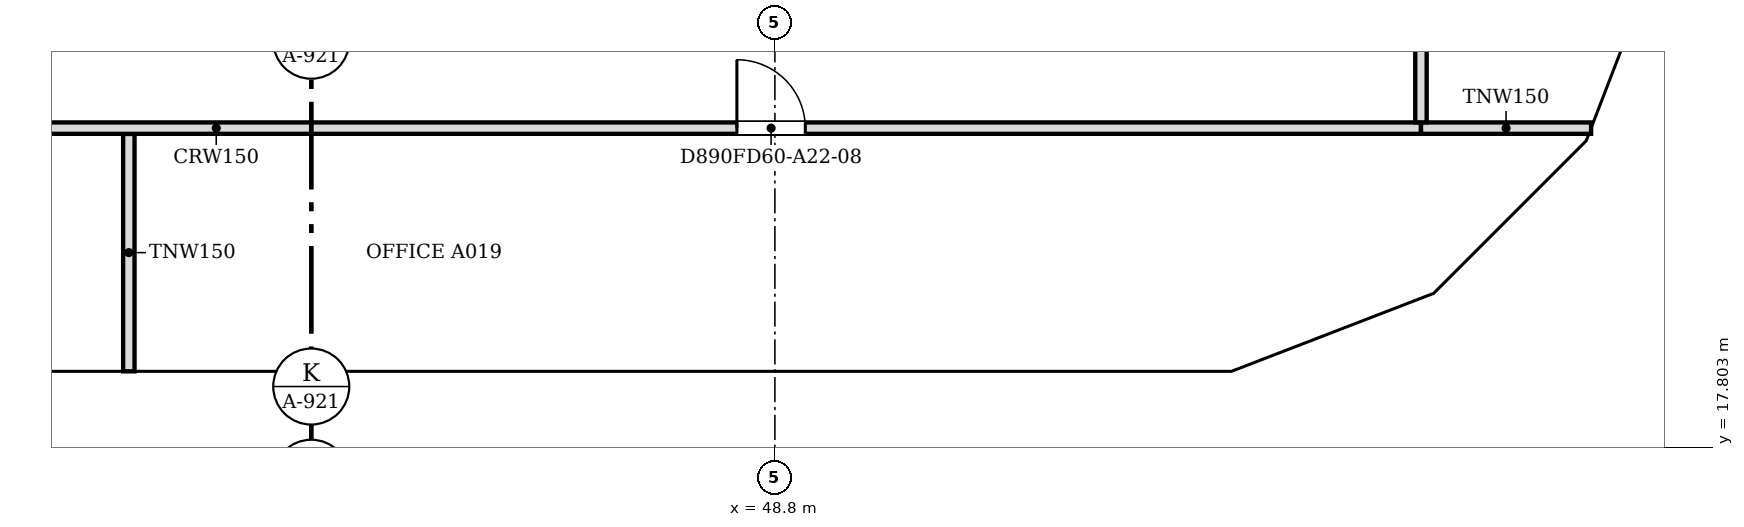
"""IFC4 building model, lengths in metres.
Left out: names, types, materials, properties, quantities, classifications, styles, units other than length and angle.
Written with IfcOpenShell. Run it as: python <this file> out.ifc"""

import sys

from ifc_helpers import new_model, si_unit, direction, frame, frame_2d, origin, place, context, subcontext, project, spatial, polyline, rectangle, outline, extrude, faceted_brep, source, transform, mapped, element, fill, save


model = new_model("IFC4")
c1 = context("Model", 3, precision=1e-05, world=origin(), true_north=direction((0.0, 1.0)))
c2 = subcontext(c1, "Body", "Model", "MODEL_VIEW")
j1 = project(units=[si_unit("LENGTHUNIT", "METRE"), si_unit("PLANEANGLEUNIT", "RADIAN")], contexts=[c1])
p1 = place(None, origin())
s1 = spatial("IfcSite", under=j1, at=p1, CompositionType="ELEMENT")
p2 = place(p1, origin())
s2 = spatial("IfcBuilding", under=s1, at=p2, CompositionType="ELEMENT")
p3 = place(p2, frame((0.0, 0.0, 252.1)))
s3 = spatial("IfcBuildingStorey", under=s2, at=p3, CompositionType="ELEMENT", Elevation=252.1)
m1 = source(origin(), c2, "Body", "Brep", [
    faceted_brep([(3.05, -0.25, 0.0), (6.1, -0.25, 3.8), (6.1, -0.25, 3.8), (3.05, -0.25, 7.6), (0.0, -0.25, 3.8), (0.0, 0.25, 3.8), (3.05, 0.25, 7.6), (6.1, 0.25, 3.8), (6.1, 0.25, 3.8), (3.05, 0.25, 0.0)], [[[0, 1, 2, 3, 4]], [[5, 6, 7, 8, 9]], [[9, 8, 1, 0]], [[7, 6, 3, 2]], [[6, 5, 4, 3]], [[5, 9, 0, 4]], [[1, 8, 7, 2]]]),
])
p4 = place(p3, frame((33.55, 18.55, -3.8), z_axis=(0.0, 0.0, 1.0), x_axis=(1.0, 0.0, 0.0)))
e1 = element("IfcWall", 1, at=p4, inside=s3, PredefinedType="SOLIDWALL", context=c2, shape_type="MappedRepresentation", body=[
    mapped(m1, transform((0.0, 0.0, 0.0), scale=1.0)),
])
m2 = source(origin(), c2, "Body", "SweptSolid", [
    extrude(outline(polyline([(3.05, 0.399), (5.78, 3.8), (3.05, 7.2), (0.321, 3.8), (3.05, 0.399)])), frame((0.0, 0.26, 0.0), z_axis=(0.0, -1.0, 0.0), x_axis=(1.0, 0.0, 0.0)), (0.0, 0.0, 1.0), 0.52),
])
p5 = place(p4, origin())
e2 = element("IfcOpeningElement", 2, at=p5, cuts=e1, PredefinedType="OPENING", context=c2, shape_type="MappedRepresentation", body=[
    mapped(m2, transform((0.0, 0.0, 0.0), scale=1.0)),
])
m3 = source(origin(), c2, "Body", "SweptSolid", [
    extrude(outline(polyline([(3.05, 0.0), (6.1, 3.8), (3.05, 7.6), (0.0, 3.8), (3.05, 0.0)])), frame((0.0, 0.25, 0.0), z_axis=(0.0, -1.0, 0.0), x_axis=(1.0, 0.0, 0.0)), (0.0, 0.0, 1.0), 0.5),
])
p6 = place(p3, frame((39.65, 18.55, -3.8), z_axis=(0.0, 0.0, 1.0), x_axis=(1.0, 0.0, 0.0)))
e3 = element("IfcWall", 3, at=p6, inside=s3, PredefinedType="SOLIDWALL", context=c2, shape_type="MappedRepresentation", body=[
    mapped(m3, transform((0.0, 0.0, 0.0), scale=1.0)),
])
p7 = place(p6, origin())
e4 = element("IfcOpeningElement", 4, at=p7, cuts=e3, PredefinedType="OPENING", context=c2, shape_type="MappedRepresentation", body=[
    mapped(m2, transform((0.0, 0.0, 0.0), scale=1.0)),
])
p8 = place(p3, frame((45.75, 18.55, -3.8), z_axis=(0.0, 0.0, 1.0), x_axis=(1.0, 0.0, 0.0)))
e5 = element("IfcWall", 5, at=p8, inside=s3, PredefinedType="SOLIDWALL", context=c2, shape_type="MappedRepresentation", body=[
    mapped(m3, transform((0.0, 0.0, 0.0), scale=1.0)),
])
p9 = place(p8, origin())
e6 = element("IfcOpeningElement", 6, at=p9, cuts=e5, PredefinedType="OPENING", context=c2, shape_type="MappedRepresentation", body=[
    mapped(m2, transform((0.0, 0.0, 0.0), scale=1.0)),
])
m4 = source(origin(), c2, "Body", "Brep", [
    faceted_brep([(3.003, -0.25, 0.0), (3.05, -0.25, 0.06), (3.05, -0.25, 7.54), (3.003, -0.25, 7.6), (0.0, -0.25, 3.8), (0.0, 0.25, 3.8), (2.957, 0.25, 7.541), (2.957, 0.25, 0.059), (3.003, 0.0, 0.0), (3.003, 0.0, 7.6)], [[[0, 1, 2, 3, 4]], [[5, 6, 7]], [[1, 0, 8]], [[9, 3, 2]], [[6, 5, 4, 3, 9]], [[5, 7, 8, 0, 4]], [[1, 8, 7, 6, 9, 2]]]),
])
p10 = place(p3, frame((51.85, 18.55, -3.8), z_axis=(0.0, 0.0, 1.0), x_axis=(1.0, 0.0, 0.0)))
e7 = element("IfcWall", 7, at=p10, inside=s3, PredefinedType="SOLIDWALL", context=c2, shape_type="MappedRepresentation", body=[
    mapped(m4, transform((0.0, 0.0, 0.0), scale=1.0)),
])
m5 = source(origin(), c2, "Body", "SweptSolid", [
    extrude(outline(polyline([(2.803, 6.944), (0.319, 3.8), (2.803, 0.656), (2.803, 6.944)])), frame((0.0, 0.26, 0.0), z_axis=(0.0, -1.0, 0.0), x_axis=(1.0, 0.0, 0.0)), (0.0, 0.0, 1.0), 0.52),
])
p11 = place(p10, origin())
e8 = element("IfcOpeningElement", 8, at=p11, cuts=e7, PredefinedType="OPENING", context=c2, shape_type="MappedRepresentation", body=[
    mapped(m5, transform((0.0, 0.0, 0.0), scale=1.0)),
])
m6 = source(origin(), c2, "Body", "Brep", [
    faceted_brep([(0.047, -0.25, 0.0), (2.997, -0.25, 3.8), (0.047, -0.25, 7.6), (0.0, -0.25, 7.541), (0.0, -0.25, 0.059), (0.093, 0.25, 7.54), (2.944, 0.25, 3.868), (2.944, 0.25, 3.732), (0.093, 0.25, 0.06), (2.997, 0.0, 3.8), (0.047, 0.0, 0.0), (0.047, 0.0, 7.6)], [[[0, 1, 2, 3, 4]], [[5, 6, 7, 8]], [[8, 7, 9, 1, 0, 10]], [[6, 5, 11, 2, 1, 9]], [[3, 2, 11]], [[10, 0, 4]], [[8, 10, 4, 3, 11, 5]], [[7, 6, 9]]]),
])
p12 = place(p3, frame((54.81, 18.533, -3.8), z_axis=(0.0, 0.0, 1.0), x_axis=(0.932990326376, 0.359901446078, 0.0)))
e9 = element("IfcWall", 9, at=p12, inside=s3, PredefinedType="SOLIDWALL", context=c2, shape_type="MappedRepresentation", body=[
    mapped(m6, transform((0.0, 0.0, 0.0), scale=1.0)),
])
m7 = source(origin(), c2, "Body", "SweptSolid", [
    extrude(outline(polyline([(0.247, 0.665), (2.681, 3.8), (0.247, 6.935), (0.247, 0.665)])), frame((0.0, 0.26, 0.0), z_axis=(0.0, -1.0, 0.0), x_axis=(1.0, 0.0, 0.0)), (0.0, 0.0, 1.0), 0.52),
])
p13 = place(p12, origin())
e10 = element("IfcOpeningElement", 10, at=p13, cuts=e9, PredefinedType="OPENING", context=c2, shape_type="MappedRepresentation", body=[
    mapped(m7, transform((0.0, 0.0, 0.0), scale=1.0)),
])
m8 = source(origin(), c2, "Body", "Brep", [
    faceted_brep([(2.944, -0.25, 0.0), (2.997, -0.25, 0.068), (2.997, -0.25, 7.532), (2.944, -0.25, 7.6), (0.0, -0.25, 3.8), (0.053, 0.25, 3.868), (2.891, 0.25, 7.532), (2.891, 0.25, 0.068), (0.053, 0.25, 3.732), (2.944, 0.0, 0.0), (2.944, 0.0, 7.6), (0.0, 0.0, 3.8)], [[[0, 1, 2, 3, 4]], [[5, 6, 7, 8]], [[1, 0, 9]], [[10, 3, 2]], [[6, 5, 11, 4, 3, 10]], [[8, 7, 9, 0, 4, 11]], [[8, 11, 5]], [[1, 9, 7, 6, 10, 2]]]),
])
p14 = place(p3, frame((57.606, 19.612, -3.8), z_axis=(0.0, 0.0, 1.0), x_axis=(0.707106781187, 0.707106781187, 0.0)))
e11 = element("IfcWall", 11, at=p14, inside=s3, PredefinedType="SOLIDWALL", context=c2, shape_type="MappedRepresentation", body=[
    mapped(m8, transform((0.0, 0.0, 0.0), scale=1.0)),
])
m9 = source(origin(), c2, "Body", "SweptSolid", [
    extrude(outline(polyline([(2.744, 6.934), (0.316, 3.8), (2.744, 0.666), (2.744, 6.934)])), frame((0.0, 0.26, 0.0), z_axis=(0.0, -1.0, 0.0), x_axis=(1.0, 0.0, 0.0)), (0.0, 0.0, 1.0), 0.52),
])
p15 = place(p14, origin())
e12 = element("IfcOpeningElement", 12, at=p15, cuts=e11, PredefinedType="OPENING", context=c2, shape_type="MappedRepresentation", body=[
    mapped(m9, transform((0.0, 0.0, 0.0), scale=1.0)),
])
m10 = source(origin(), c2, "Body", "Brep", [
    faceted_brep([(0.053, -0.25, 0.0), (3.003, -0.25, 3.8), (0.053, -0.25, 7.6), (0.0, -0.25, 7.531), (0.0, -0.25, 0.068), (0.106, 0.25, 7.532), (2.957, 0.25, 3.86), (2.957, 0.25, 3.74), (0.106, 0.25, 0.068), (3.003, 0.0, 3.8), (0.053, 0.0, 0.0), (0.053, 0.0, 7.6)], [[[0, 1, 2, 3, 4]], [[5, 6, 7, 8]], [[8, 7, 9, 1, 0, 10]], [[6, 5, 11, 2, 1, 9]], [[3, 2, 11]], [[10, 0, 4]], [[8, 10, 4, 3, 11, 5]], [[7, 6, 9]]]),
])
p16 = place(p3, frame((59.669, 21.644, -3.8), z_axis=(0.0, 0.0, 1.0), x_axis=(0.35992665181, 0.932980602862, 0.0)))
e13 = element("IfcWall", 13, at=p16, inside=s3, PredefinedType="SOLIDWALL", context=c2, shape_type="MappedRepresentation", body=[
    mapped(m10, transform((0.0, 0.0, 0.0), scale=1.0)),
])
m11 = source(origin(), c2, "Body", "SweptSolid", [
    extrude(outline(polyline([(0.253, 0.665), (2.687, 3.8), (0.253, 6.935), (0.253, 0.665)])), frame((0.0, 0.26, 0.0), z_axis=(0.0, -1.0, 0.0), x_axis=(1.0, 0.0, 0.0)), (0.0, 0.0, 1.0), 0.52),
])
p17 = place(p16, origin())
e14 = element("IfcOpeningElement", 14, at=p17, cuts=e13, PredefinedType="OPENING", context=c2, shape_type="MappedRepresentation", body=[
    mapped(m11, transform((0.0, 0.0, 0.0), scale=1.0)),
])
p18 = place(p2, frame((0.0, 0.0, 255.9)))
s4 = spatial("IfcBuildingStorey", under=s2, at=p18, CompositionType="ELEMENT", Elevation=255.9)
m12 = source(origin(), c2, "Body", "Brep", [
    faceted_brep([(3.05, -0.25, 0.0), (6.1, -0.25, 3.8), (6.1, -0.25, 3.8), (3.05, -0.25, 7.6), (0.0, -0.25, 3.8), (0.0, 0.25, 3.8), (3.05, 0.25, 7.6), (6.1, 0.25, 3.8), (6.1, 0.25, 3.8), (3.05, 0.25, 0.0)], [[[0, 1, 2, 3, 4]], [[5, 6, 7, 8, 9]], [[9, 8, 1, 0]], [[7, 6, 3, 2]], [[6, 5, 4, 3]], [[5, 9, 0, 4]], [[1, 8, 7, 2]]]),
])
p19 = place(p18, frame((36.6, 18.55, -3.8), z_axis=(0.0, 0.0, 1.0), x_axis=(1.0, 0.0, 0.0)))
e15 = element("IfcWall", 15, at=p19, inside=s4, PredefinedType="SOLIDWALL", context=c2, shape_type="MappedRepresentation", body=[
    mapped(m12, transform((0.0, 0.0, 0.0), scale=1.0)),
])
m13 = source(origin(), c2, "Body", "SweptSolid", [
    extrude(outline(polyline([(3.05, 0.399), (5.78, 3.8), (3.05, 7.2), (0.321, 3.8), (3.05, 0.399)])), frame((0.0, 0.26, 0.0), z_axis=(0.0, -1.0, 0.0), x_axis=(1.0, 0.0, 0.0)), (0.0, 0.0, 1.0), 0.52),
])
p20 = place(p19, origin())
e16 = element("IfcOpeningElement", 16, at=p20, cuts=e15, PredefinedType="OPENING", context=c2, shape_type="MappedRepresentation", body=[
    mapped(m13, transform((0.0, 0.0, 0.0), scale=1.0)),
])
m14 = source(origin(), c2, "Body", "SweptSolid", [
    extrude(outline(polyline([(3.05, 0.0), (6.1, 3.8), (3.05, 7.6), (0.0, 3.8), (3.05, 0.0)])), frame((0.0, 0.25, 0.0), z_axis=(0.0, -1.0, 0.0), x_axis=(1.0, 0.0, 0.0)), (0.0, 0.0, 1.0), 0.5),
])
p21 = place(p18, frame((42.7, 18.55, -3.8), z_axis=(0.0, 0.0, 1.0), x_axis=(1.0, 0.0, 0.0)))
e17 = element("IfcWall", 17, at=p21, inside=s4, PredefinedType="SOLIDWALL", context=c2, shape_type="MappedRepresentation", body=[
    mapped(m14, transform((0.0, 0.0, 0.0), scale=1.0)),
])
p22 = place(p21, origin())
e18 = element("IfcOpeningElement", 18, at=p22, cuts=e17, PredefinedType="OPENING", context=c2, shape_type="MappedRepresentation", body=[
    mapped(m13, transform((0.0, 0.0, 0.0), scale=1.0)),
])
m15 = source(origin(), c2, "Body", "Brep", [
    faceted_brep([(3.05, -0.25, 0.0), (6.053, -0.25, 3.8), (3.05, -0.25, 7.6), (0.0, -0.25, 3.8), (0.0, 0.25, 3.8), (3.05, 0.25, 7.6), (6.007, 0.25, 3.859), (6.007, 0.25, 3.741), (3.05, 0.25, 0.0), (6.053, 0.0, 3.8)], [[[0, 1, 2, 3]], [[4, 5, 6, 7, 8]], [[8, 7, 9, 1, 0]], [[6, 5, 2, 1, 9]], [[5, 4, 3, 2]], [[4, 8, 0, 3]], [[9, 7, 6]]]),
])
p23 = place(p18, frame((48.8, 18.55, -3.8), z_axis=(0.0, 0.0, 1.0), x_axis=(1.0, 0.0, 0.0)))
e19 = element("IfcWall", 19, at=p23, inside=s4, PredefinedType="SOLIDWALL", context=c2, shape_type="MappedRepresentation", body=[
    mapped(m15, transform((0.0, 0.0, 0.0), scale=1.0)),
])
m16 = source(origin(), c2, "Body", "SweptSolid", [
    extrude(outline(polyline([(3.049, 0.401), (5.735, 3.8), (3.049, 7.199), (0.321, 3.8), (3.049, 0.401)])), frame((0.0, 0.26, 0.0), z_axis=(0.0, -1.0, 0.0), x_axis=(1.0, 0.0, 0.0)), (0.0, 0.0, 1.0), 0.52),
])
p24 = place(p23, origin())
e20 = element("IfcOpeningElement", 20, at=p24, cuts=e19, PredefinedType="OPENING", context=c2, shape_type="MappedRepresentation", body=[
    mapped(m16, transform((0.0, 0.0, 0.0), scale=1.0)),
])
m17 = source(origin(), c2, "Body", "Brep", [
    faceted_brep([(2.95, -0.25, 0.0), (3.003, -0.25, 0.068), (3.003, -0.25, 7.531), (2.95, -0.25, 7.6), (0.0, -0.25, 3.8), (0.047, 0.25, 3.86), (2.898, 0.25, 7.532), (2.898, 0.25, 0.068), (0.047, 0.25, 3.74), (2.95, 0.0, 0.0), (2.95, 0.0, 7.6), (0.0, 0.0, 3.8)], [[[0, 1, 2, 3, 4]], [[5, 6, 7, 8]], [[1, 0, 9]], [[10, 3, 2]], [[6, 5, 11, 4, 3, 10]], [[8, 7, 9, 0, 4, 11]], [[8, 11, 5]], [[1, 9, 7, 6, 10, 2]]]),
])
p25 = place(p18, frame((54.854, 18.55, -3.8), z_axis=(0.0, 0.0, 1.0), x_axis=(0.932997369089, 0.359883188373, 0.0)))
e21 = element("IfcWall", 21, at=p25, inside=s4, PredefinedType="SOLIDWALL", context=c2, shape_type="MappedRepresentation", body=[
    mapped(m17, transform((0.0, 0.0, 0.0), scale=1.0)),
])
m18 = source(origin(), c2, "Body", "SweptSolid", [
    extrude(outline(polyline([(2.75, 6.935), (0.316, 3.8), (2.75, 0.665), (2.75, 6.935)])), frame((0.0, 0.26, 0.0), z_axis=(0.0, -1.0, 0.0), x_axis=(1.0, 0.0, 0.0)), (0.0, 0.0, 1.0), 0.52),
])
p26 = place(p25, origin())
e22 = element("IfcOpeningElement", 22, at=p26, cuts=e21, PredefinedType="OPENING", context=c2, shape_type="MappedRepresentation", body=[
    mapped(m18, transform((0.0, 0.0, 0.0), scale=1.0)),
])
m19 = source(origin(), c2, "Body", "Brep", [
    faceted_brep([(0.053, -0.25, 0.0), (2.997, -0.25, 3.8), (0.053, -0.25, 7.6), (0.0, -0.25, 7.532), (0.0, -0.25, 0.068), (0.106, 0.25, 7.531), (2.944, 0.25, 3.868), (2.944, 0.25, 3.732), (0.106, 0.25, 0.068), (2.997, 0.0, 3.8), (0.053, 0.0, 0.0), (0.053, 0.0, 7.6)], [[[0, 1, 2, 3, 4]], [[5, 6, 7, 8]], [[8, 7, 9, 1, 0, 10]], [[6, 5, 11, 2, 1, 9]], [[3, 2, 11]], [[10, 0, 4]], [[8, 10, 4, 3, 11, 5]], [[9, 7, 6]]]),
])
p27 = place(p18, frame((57.569, 19.574, -3.8), z_axis=(0.0, 0.0, 1.0), x_axis=(0.707106781187, 0.707106781187, 0.0)))
e23 = element("IfcWall", 23, at=p27, inside=s4, PredefinedType="SOLIDWALL", context=c2, shape_type="MappedRepresentation", body=[
    mapped(m19, transform((0.0, 0.0, 0.0), scale=1.0)),
])
m20 = source(origin(), c2, "Body", "SweptSolid", [
    extrude(outline(polyline([(0.253, 0.666), (2.681, 3.8), (0.253, 6.934), (0.253, 0.666)])), frame((0.0, 0.26, 0.0), z_axis=(0.0, -1.0, 0.0), x_axis=(1.0, 0.0, 0.0)), (0.0, 0.0, 1.0), 0.52),
])
p28 = place(p27, origin())
e24 = element("IfcOpeningElement", 24, at=p28, cuts=e23, PredefinedType="OPENING", context=c2, shape_type="MappedRepresentation", body=[
    mapped(m20, transform((0.0, 0.0, 0.0), scale=1.0)),
])
m21 = source(origin(), c2, "Body", "Brep", [
    faceted_brep([(2.95, -0.25, 0.0), (2.997, -0.25, 0.059), (2.997, -0.25, 7.541), (2.95, -0.25, 7.6), (0.0, -0.25, 3.8), (0.053, 0.25, 3.868), (2.904, 0.25, 7.54), (2.904, 0.25, 0.06), (0.053, 0.25, 3.732), (2.95, 0.0, 0.0), (2.95, 0.0, 7.6), (0.0, 0.0, 3.8)], [[[0, 1, 2, 3, 4]], [[5, 6, 7, 8]], [[1, 0, 9]], [[10, 3, 2]], [[6, 5, 11, 4, 3, 10]], [[8, 7, 9, 0, 4, 11]], [[8, 11, 5]], [[1, 9, 7, 6, 10, 2]]]),
])
p29 = place(p18, frame((59.688, 21.694, -3.8), z_axis=(0.0, 0.0, 1.0), x_axis=(0.359972353723, 0.932962970624, 0.0)))
e25 = element("IfcWall", 25, at=p29, inside=s4, PredefinedType="SOLIDWALL", context=c2, shape_type="MappedRepresentation", body=[
    mapped(m21, transform((0.0, 0.0, 0.0), scale=1.0)),
])
p30 = place(p29, origin())
e26 = element("IfcOpeningElement", 26, at=p30, cuts=e25, PredefinedType="OPENING", context=c2, shape_type="MappedRepresentation", body=[
    mapped(m18, transform((0.0, 0.0, 0.0), scale=1.0)),
])
p31 = place(p3, frame((40.3, 18.8, 0.0), z_axis=(0.0, 0.0, 1.0), x_axis=(0.0, 1.0, 0.0)))
e27 = element("IfcWall", 27, at=p31, inside=s3, PredefinedType="PARTITIONING", context=c2, shape_type="SweptSolid", body=[
    extrude(rectangle(XDim=3.124, YDim=0.15, at=frame_2d((1.562, 0.0))), origin(), (0.0, 0.0, 1.0), 3.067),
])
p32 = place(p3, frame((57.3, 22.0, 0.0), z_axis=(0.0, 0.0, 1.0), x_axis=(-1.0, 0.0, 0.0)))
e28 = element("IfcWall", 28, at=p32, inside=s3, PredefinedType="PARTITIONING", context=c2, shape_type="SweptSolid", body=[
    extrude(rectangle(XDim=29.2, YDim=0.15, at=frame_2d((14.6, 0.0))), origin(), (0.0, 0.0, 1.0), 3.067),
])
m22 = source(origin(), c2, "Body", "SweptSolid", [
    extrude(rectangle(XDim=0.9, YDim=2.1, at=frame_2d((0.45, 1.05))), frame((0.0, 0.085, 0.0), z_axis=(0.0, -1.0, 0.0), x_axis=(1.0, 0.0, 0.0)), (0.0, 0.0, 1.0), 0.17),
])
p33 = place(p32, frame((22.7, 0.0, 0.0)))
e29 = element("IfcOpeningElement", 29, at=p33, cuts=e28, PredefinedType="OPENING", context=c2, shape_type="MappedRepresentation", body=[
    mapped(m22, transform((0.0, 0.0, 0.0), scale=1.0)),
])
p34 = place(p32, frame((8.1, 0.0, 0.0)))
e30 = element("IfcOpeningElement", 30, at=p34, cuts=e28, PredefinedType="OPENING", context=c2, shape_type="MappedRepresentation", body=[
    mapped(m22, transform((0.0, 0.0, 0.0), scale=1.0)),
])
p35 = place(p3, frame((57.301, 22.0, 0.0), z_axis=(0.0, 0.0, 1.0), x_axis=(1.0, 0.0, 0.0)))
e31 = element("IfcWall", 31, at=p35, inside=s3, PredefinedType="PARTITIONING", context=c2, shape_type="SweptSolid", body=[
    extrude(rectangle(XDim=2.237, YDim=0.15, at=frame_2d((1.119, 0.0))), origin(), (0.0, 0.0, 1.0), 3.067),
])
p36 = place(p3, frame((57.3, 30.6, 0.0), z_axis=(0.0, 0.0, 1.0), x_axis=(0.0, -1.0, 0.0)))
e32 = element("IfcWall", 32, at=p36, inside=s3, PredefinedType="PARTITIONING", context=c2, shape_type="SweptSolid", body=[
    extrude(rectangle(XDim=8.524, YDim=0.15, at=frame_2d((4.262, 0.0))), origin(), (0.0, 0.0, 1.0), 3.067),
])
p37 = place(p36, frame((3.824, 0.0, 0.0)))
e33 = element("IfcOpeningElement", 33, at=p37, cuts=e32, PredefinedType="OPENING", context=c2, shape_type="MappedRepresentation", body=[
    mapped(m22, transform((0.0, 0.0, 0.0), scale=1.0)),
])
m23 = source(origin(), c2, "Body", "SweptSolid", [
    extrude(rectangle(XDim=0.9, YDim=2.1, at=frame_2d((0.45, 1.05))), frame((0.0, 0.025, 0.0), z_axis=(0.0, -1.0, 0.0), x_axis=(1.0, 0.0, 0.0)), (0.0, 0.0, 1.0), 0.05),
])
p38 = place(p34, origin())
e34 = element("IfcDoor", 34, at=p38, inside=s3, OperationType="SINGLE_SWING_RIGHT", PredefinedType="DOOR", context=c2, shape_type="MappedRepresentation", body=[
    mapped(m23, transform((0.0, 0.0, 0.0), scale=1.0)),
])
fill(e30, e34)
save(model, sys.argv[1])
